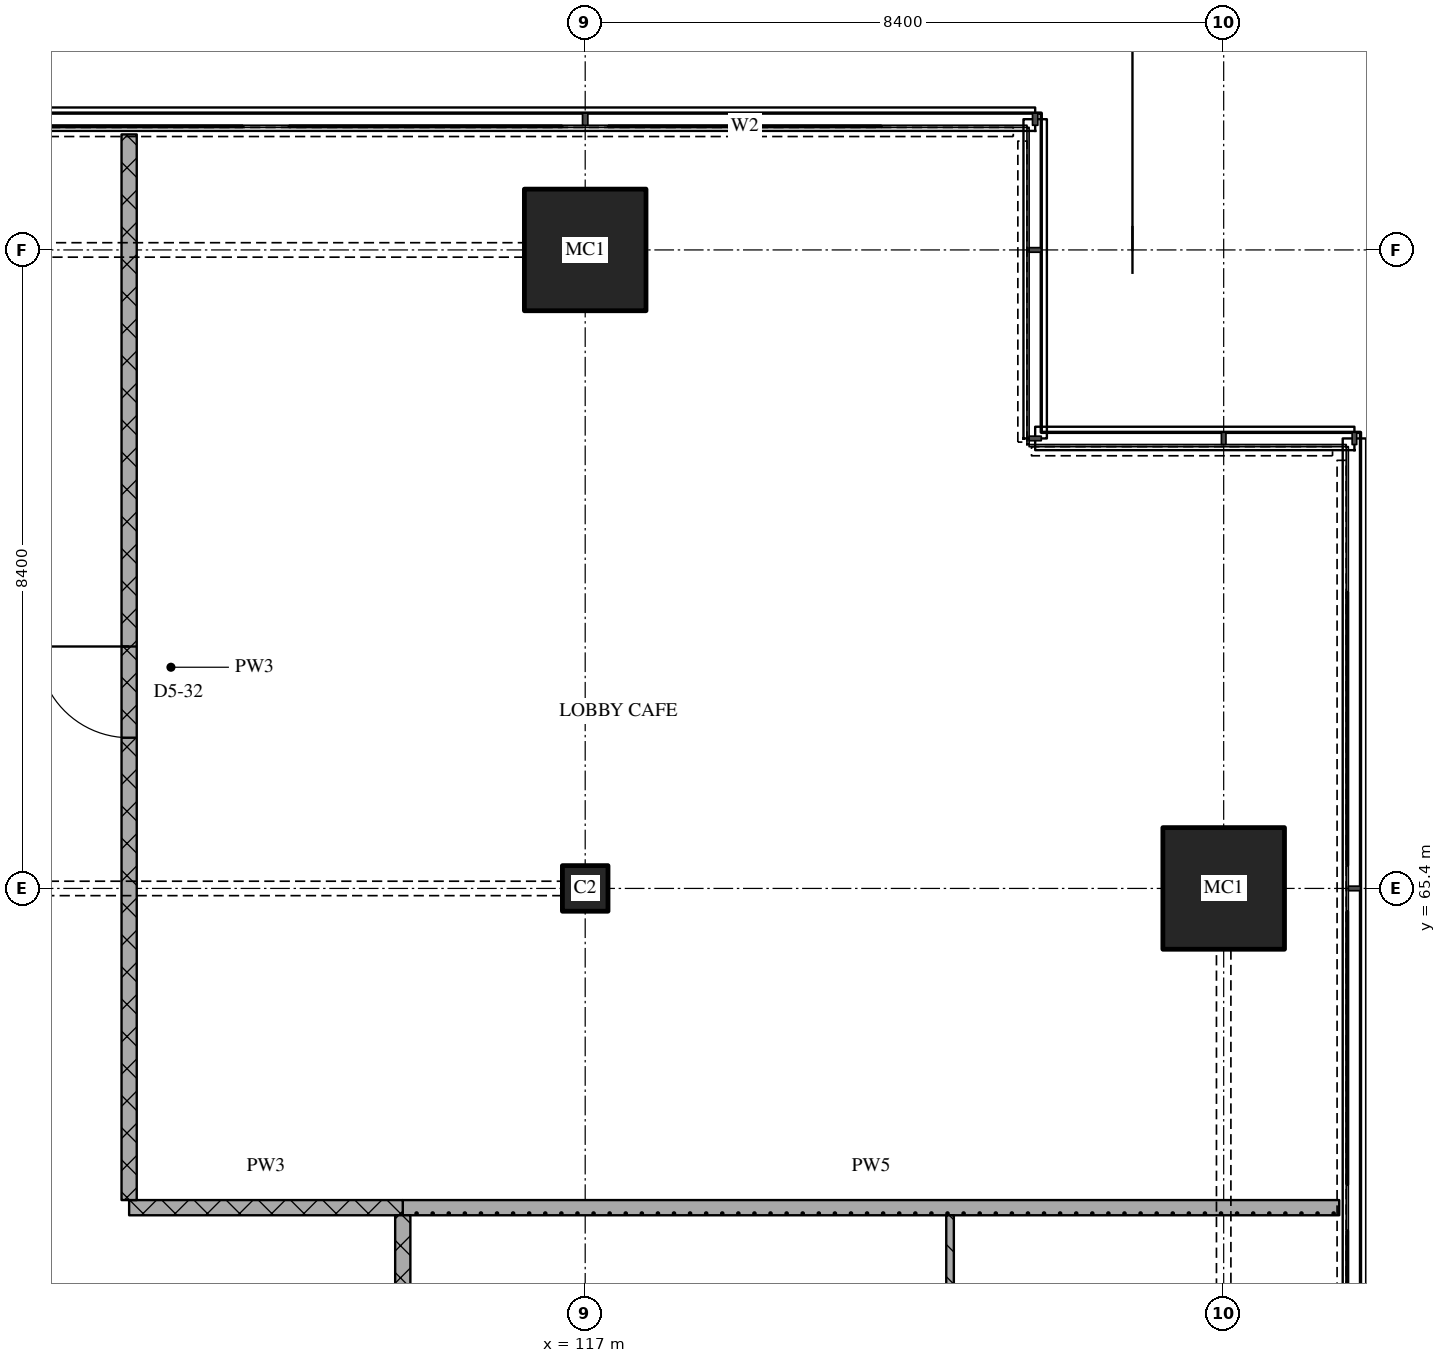
"""IFC4 building model, lengths in metres.
Left out: names, types, materials, properties, quantities, classifications, styles, units other than length and angle.
Written with IfcOpenShell. Run it as: python <this file> out.ifc"""

import sys

from ifc_helpers import new_model, si_unit, direction, frame, frame_2d, origin, origin_2d, place, context, subcontext, project, spatial, rectangle, extrude, element, fill, save


model = new_model("IFC4")
c1 = context("Model", 3, precision=1e-05, world=origin(), true_north=direction((0.0, 1.0)))
c2 = subcontext(c1, "Body", "Model", "MODEL_VIEW")
j1 = project(units=[si_unit("LENGTHUNIT", "METRE"), si_unit("PLANEANGLEUNIT", "RADIAN")], contexts=[c1])
p1 = place(None, origin())
s1 = spatial("IfcSite", under=j1, at=p1, CompositionType="ELEMENT")
p2 = place(p1, origin())
s2 = spatial("IfcBuilding", under=s1, at=p2, CompositionType="ELEMENT")
p3 = place(p2, frame((0.0, 0.0, 248.7)))
s3 = spatial("IfcBuildingStorey", under=s2, at=p3, CompositionType="ELEMENT", Elevation=248.7)
p4 = place(p3, frame((117.0, 65.4, 0.0), z_axis=(0.0, 0.0, 1.0), x_axis=(1.0, 0.0, 0.0)))
e1 = element("IfcColumn", 1, at=p4, inside=s3, PredefinedType="COLUMN", context=c2, shape_type="SweptSolid", body=[
    extrude(rectangle(XDim=0.6, YDim=0.6, at=origin_2d()), origin(), (0.0, 0.0, 1.0), 3.6),
])
for number, where, z_axis, x_axis in (
    (2, (117.0, 73.8, 0.0), (0.0, 0.0, 1.0), (1.0, 0.0, 0.0)),
    (3, (125.4, 65.4, 0.0), (0.0, 0.0, 1.0), (1.0, 0.0, 0.0)),
):
    element("IfcColumn", number, at=place(p3, frame(where, z_axis=z_axis, x_axis=x_axis)), inside=s3, PredefinedType="COLUMN", context=c2, shape_type="SweptSolid", body=[
        extrude(rectangle(XDim=1.6, YDim=1.6, at=origin_2d()), origin(), (0.0, 0.0, 1.0), 3.6),
    ])
p5 = place(p3, frame((111.0, 61.2, 0.0), z_axis=(0.0, 0.0, 1.0), x_axis=(1.0, 0.0, 0.0)))
e4 = element("IfcWall", 4, at=p5, inside=s3, PredefinedType="PARTITIONING", context=c2, shape_type="SweptSolid", body=[
    extrude(rectangle(XDim=3.6, YDim=0.2, at=frame_2d((1.8, 0.0))), origin(), (0.0, 0.0, 1.0), 3.3),
])
p6 = place(p3, frame((114.6, 61.2, 0.0), z_axis=(0.0, 0.0, 1.0), x_axis=(1.0, 0.0, 0.0)))
e5 = element("IfcWall", 5, at=p6, inside=s3, PredefinedType="PARTITIONING", context=c2, shape_type="SweptSolid", body=[
    extrude(rectangle(XDim=12.32, YDim=0.2, at=frame_2d((6.16, 0.0))), origin(), (0.0, 0.0, 1.0), 3.3),
])
p7 = place(p3, frame((111.0, 75.32, 0.0), z_axis=(0.0, 0.0, 1.0), x_axis=(0.0, -1.0, 0.0)))
e6 = element("IfcWall", 6, at=p7, inside=s3, PredefinedType="PARTITIONING", context=c2, shape_type="SweptSolid", body=[
    extrude(rectangle(XDim=14.02, YDim=0.2, at=frame_2d((7.01, 0.0))), origin(), (0.0, 0.0, 1.0), 3.3),
])
p8 = place(p7, frame((6.737, 0.0, 0.0)))
e7 = element("IfcOpeningElement", 7, at=p8, cuts=e6, PredefinedType="OPENING", context=c2, shape_type="SweptSolid", body=[
    extrude(rectangle(XDim=1.2, YDim=2.1, at=frame_2d((0.6, 1.05))), frame((0.0, 0.11, 0.0), z_axis=(0.0, -1.0, 0.0), x_axis=(1.0, 0.0, 0.0)), (0.0, 0.0, 1.0), 0.22),
])
p9 = place(p3, frame((114.6, 61.1, 0.0), z_axis=(0.0, 0.0, 1.0), x_axis=(0.0, -1.0, 0.0)))
e8 = element("IfcWall", 8, at=p9, inside=s3, PredefinedType="PARTITIONING", context=c2, shape_type="SweptSolid", body=[
    extrude(rectangle(XDim=17.8, YDim=0.2, at=frame_2d((8.9, 0.0))), origin(), (0.0, 0.0, 1.0), 3.3),
])
p10 = place(p9, frame((8.55, 0.0, 0.0)))
e9 = element("IfcOpeningElement", 9, at=p10, cuts=e8, PredefinedType="OPENING", context=c2, shape_type="SweptSolid", body=[
    extrude(rectangle(XDim=1.0, YDim=2.1, at=frame_2d((0.5, 1.05))), frame((0.0, 0.11, 0.0), z_axis=(0.0, -1.0, 0.0), x_axis=(1.0, 0.0, 0.0)), (0.0, 0.0, 1.0), 0.22),
])
p11 = place(p3, frame((121.8, 61.1, 0.0), z_axis=(0.0, 0.0, 1.0), x_axis=(0.0, -1.0, 0.0)))
e10 = element("IfcWall", 10, at=p11, inside=s3, PredefinedType="PARTITIONING", context=c2, shape_type="SweptSolid", body=[
    extrude(rectangle(XDim=8.25, YDim=0.1, at=frame_2d((4.125, 0.0))), origin(), (0.0, 0.0, 1.0), 3.3),
])
p12 = place(p11, frame((3.65, 0.0, 0.0)))
e11 = element("IfcOpeningElement", 11, at=p12, cuts=e10, PredefinedType="OPENING", context=c2, shape_type="SweptSolid", body=[
    extrude(rectangle(XDim=0.9, YDim=2.1, at=frame_2d((0.45, 1.05))), frame((0.0, 0.06, 0.0), z_axis=(0.0, -1.0, 0.0), x_axis=(1.0, 0.0, 0.0)), (0.0, 0.0, 1.0), 0.12),
])
p13 = place(p8, origin())
e12 = element("IfcDoor", 12, at=p13, inside=s3, OperationType="SINGLE_SWING_RIGHT", PredefinedType="DOOR", context=c2, shape_type="SweptSolid", body=[
    extrude(rectangle(XDim=1.2, YDim=2.1, at=frame_2d((0.6, 1.05))), frame((0.0, 0.025, 0.0), z_axis=(0.0, -1.0, 0.0), x_axis=(1.0, 0.0, 0.0)), (0.0, 0.0, 1.0), 0.05),
])
fill(e7, e12)
save(model, sys.argv[1])
